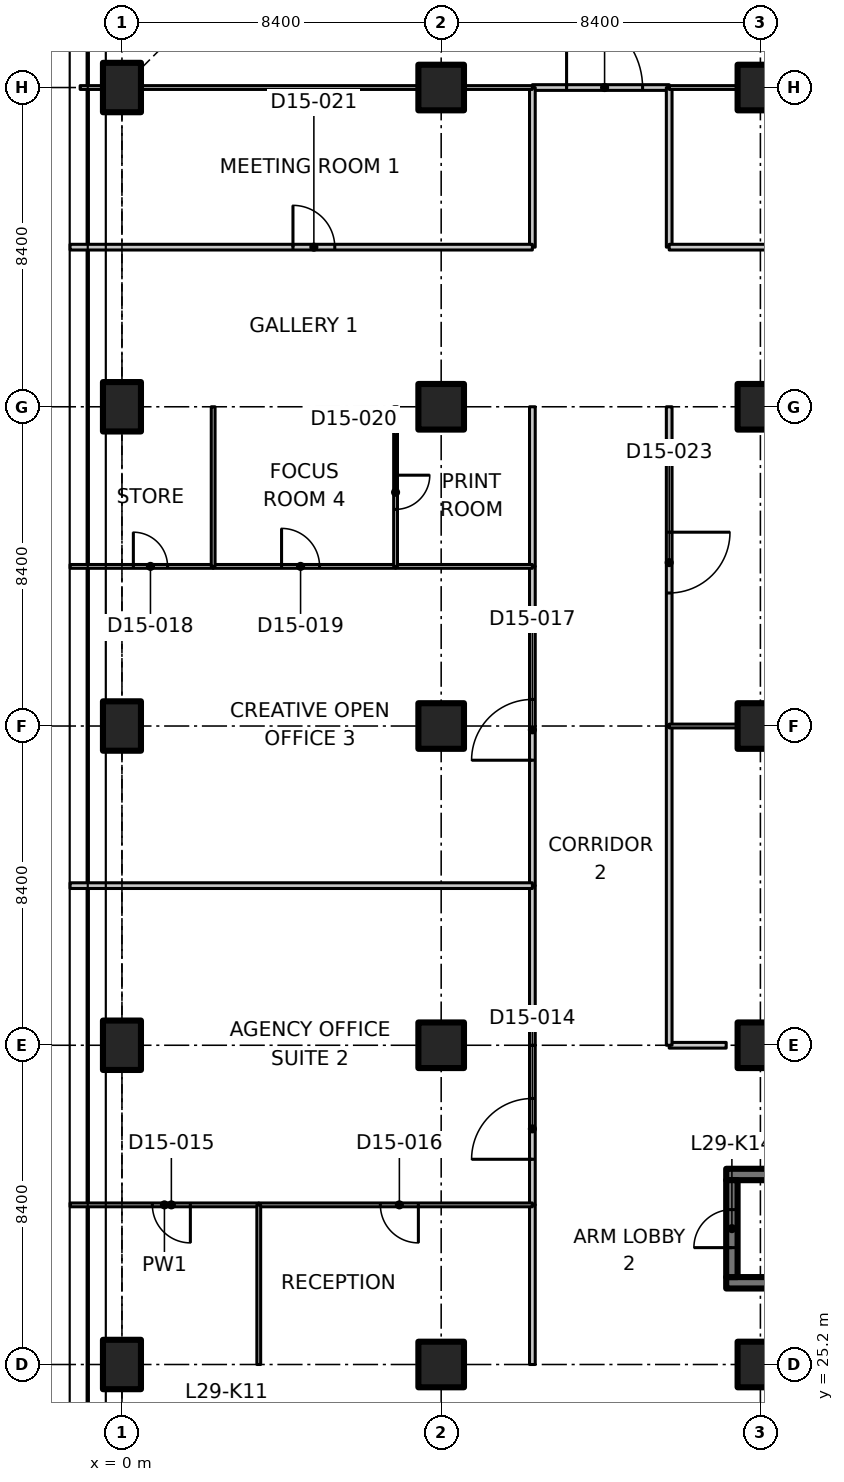
"""IFC4 building model, lengths in metres.
Left out: names, types, materials, properties, quantities, classifications, styles, units other than length and angle.
Written with IfcOpenShell. Run it as: python <this file> out.ifc"""

import sys

from ifc_helpers import new_model, si_unit, direction, frame, frame_2d, origin, origin_2d, place, context, subcontext, project, spatial, polyline, rectangle, outline, extrude, element, fill, save


model = new_model("IFC4")
c1 = context("Model", 3, precision=1e-05, world=origin(), true_north=direction((0.0, 1.0)))
c2 = subcontext(c1, "Body", "Model", "MODEL_VIEW")
j1 = project(units=[si_unit("LENGTHUNIT", "METRE"), si_unit("PLANEANGLEUNIT", "RADIAN")], contexts=[c1])
p1 = place(None, origin())
s1 = spatial("IfcSite", under=j1, at=p1, CompositionType="ELEMENT")
p2 = place(p1, origin())
s2 = spatial("IfcBuilding", under=s1, at=p2, CompositionType="ELEMENT")
p3 = place(p2, frame((0.0, 0.0, 120.5)))
s3 = spatial("IfcBuildingStorey", under=s2, at=p3, CompositionType="ELEMENT", Elevation=120.5)
for number, where, z_axis, x_axis in (
    (1, (0.0, 25.2, 0.0), (0.0, 0.0, 1.0), (1.0, 0.0, 0.0)),
    (2, (0.0, 33.6, 0.0), (0.0, 0.0, 1.0), (1.0, 0.0, 0.0)),
    (3, (0.0, 42.0, 0.0), (0.0, 0.0, 1.0), (1.0, 0.0, 0.0)),
    (4, (0.0, 50.4, 0.0), (0.0, 0.0, 1.0), (1.0, 0.0, 0.0)),
    (5, (0.0, 58.8, 0.0), (0.0, 0.0, 1.0), (1.0, 0.0, 0.0)),
):
    element("IfcColumn", number, at=place(p3, frame(where, z_axis=z_axis, x_axis=x_axis)), inside=s3, PredefinedType="COLUMN", context=c2, shape_type="SweptSolid", body=[
        extrude(rectangle(XDim=1.0, YDim=1.3, at=origin_2d()), origin(), (0.0, 0.0, 1.0), 3.35),
    ])
for number, where, z_axis, x_axis in (
    (6, (8.4, 25.2, 0.0), (0.0, 0.0, 1.0), (1.0, 0.0, 0.0)),
    (7, (8.4, 33.6, 0.0), (0.0, 0.0, 1.0), (1.0, 0.0, 0.0)),
    (8, (8.4, 42.0, 0.0), (0.0, 0.0, 1.0), (1.0, 0.0, 0.0)),
    (9, (8.4, 50.4, 0.0), (0.0, 0.0, 1.0), (1.0, 0.0, 0.0)),
    (10, (8.4, 58.8, 0.0), (0.0, 0.0, 1.0), (1.0, 0.0, 0.0)),
    (11, (16.8, 25.2, 0.0), (0.0, 0.0, 1.0), (1.0, 0.0, 0.0)),
    (12, (16.8, 33.6, 0.0), (0.0, 0.0, 1.0), (1.0, 0.0, 0.0)),
    (13, (16.8, 42.0, 0.0), (0.0, 0.0, 1.0), (1.0, 0.0, 0.0)),
    (14, (16.8, 50.4, 0.0), (0.0, 0.0, 1.0), (1.0, 0.0, 0.0)),
    (15, (16.8, 58.8, 0.0), (0.0, 0.0, 1.0), (1.0, 0.0, 0.0)),
):
    element("IfcColumn", number, at=place(p3, frame(where, z_axis=z_axis, x_axis=x_axis)), inside=s3, PredefinedType="COLUMN", context=c2, shape_type="SweptSolid", body=[
        extrude(rectangle(XDim=1.2, YDim=1.2, at=origin_2d()), origin(), (0.0, 0.0, 1.0), 3.35),
    ])
for number, where, z_axis, x_axis in (
    (16, (15.9, 27.35, 0.0), (0.0, 0.0, 1.0), (1.0, 0.0, 0.0)),
    (17, (15.9, 30.2, 0.0), (0.0, 0.0, 1.0), (1.0, 0.0, 0.0)),
):
    element("IfcWall", number, at=place(p3, frame(where, z_axis=z_axis, x_axis=x_axis)), inside=s3, PredefinedType="SHEAR", context=c2, shape_type="SweptSolid", body=[
        extrude(rectangle(XDim=8.2, YDim=0.3, at=frame_2d((4.1, 0.0))), origin(), (0.0, 0.0, 1.0), 3.35),
    ])
p4 = place(p3, frame((16.05, 27.5, 0.0), z_axis=(0.0, 0.0, 1.0), x_axis=(0.0, 1.0, 0.0)))
e18 = element("IfcWall", 18, at=p4, inside=s3, PredefinedType="SHEAR", context=c2, shape_type="SweptSolid", body=[
    extrude(rectangle(XDim=2.55, YDim=0.3, at=frame_2d((1.275, 0.0))), origin(), (0.0, 0.0, 1.0), 3.35),
])
p5 = place(p4, frame((0.775, 0.0, 0.0)))
e19 = element("IfcOpeningElement", 19, at=p5, cuts=e18, PredefinedType="OPENING", context=c2, shape_type="SweptSolid", body=[
    extrude(rectangle(XDim=1.0, YDim=2.1, at=frame_2d((0.5, 1.05))), frame((0.0, 0.16, 0.0), z_axis=(0.0, -1.0, 0.0), x_axis=(1.0, 0.0, 0.0)), (0.0, 0.0, 1.0), 0.32),
])
p6 = place(p3, frame((10.8, 29.4, 0.0), z_axis=(0.0, 0.0, 1.0), x_axis=(0.0, 1.0, 0.0)))
e20 = element("IfcWall", 20, at=p6, inside=s3, PredefinedType="PARTITIONING", context=c2, shape_type="SweptSolid", body=[
    extrude(rectangle(XDim=4.2, YDim=0.15, at=frame_2d((2.1, 0.0))), origin(), (0.0, 0.0, 1.0), 3.33),
])
p7 = place(p6, frame((1.2, 0.0, 0.0)))
e21 = element("IfcOpeningElement", 21, at=p7, cuts=e20, PredefinedType="OPENING", context=c2, shape_type="SweptSolid", body=[
    extrude(rectangle(XDim=1.6, YDim=2.1, at=frame_2d((0.8, 1.05))), frame((0.0, 0.085, 0.0), z_axis=(0.0, -1.0, 0.0), x_axis=(1.0, 0.0, 0.0)), (0.0, 0.0, 1.0), 0.17),
])
p8 = place(p3, frame((10.8, 25.2, 0.0), z_axis=(0.0, 0.0, 1.0), x_axis=(0.0, 1.0, 0.0)))
e22 = element("IfcWall", 22, at=p8, inside=s3, PredefinedType="PARTITIONING", context=c2, shape_type="SweptSolid", body=[
    extrude(rectangle(XDim=4.2, YDim=0.15, at=frame_2d((2.1, 0.0))), origin(), (0.0, 0.0, 1.0), 3.33),
])
p9 = place(p3, frame((14.4, 33.6, 0.0), z_axis=(0.0, 0.0, 1.0), x_axis=(1.0, 0.0, 0.0)))
e23 = element("IfcWall", 23, at=p9, inside=s3, PredefinedType="PARTITIONING", context=c2, shape_type="SweptSolid", body=[
    extrude(rectangle(XDim=1.5, YDim=0.15, at=frame_2d((0.75, 0.0))), origin(), (0.0, 0.0, 1.0), 3.33),
])
p10 = place(p3, frame((10.8, 58.8, 0.0), z_axis=(0.0, 0.0, 1.0), x_axis=(1.0, 0.0, 0.0)))
e24 = element("IfcWall", 24, at=p10, inside=s3, PredefinedType="PARTITIONING", context=c2, shape_type="SweptSolid", body=[
    extrude(rectangle(XDim=3.6, YDim=0.15, at=frame_2d((1.8, 0.0))), origin(), (0.0, 0.0, 1.0), 3.33),
])
p11 = place(p10, frame((0.9, 0.0, 0.0)))
e25 = element("IfcOpeningElement", 25, at=p11, cuts=e24, PredefinedType="OPENING", context=c2, shape_type="SweptSolid", body=[
    extrude(rectangle(XDim=2.0, YDim=2.4, at=frame_2d((1.0, 1.2))), frame((0.0, 0.085, 0.0), z_axis=(0.0, -1.0, 0.0), x_axis=(1.0, 0.0, 0.0)), (0.0, 0.0, 1.0), 0.17),
])
p12 = place(p3, frame((10.8, 33.6, 0.0), z_axis=(0.0, 0.0, 1.0), x_axis=(0.0, 1.0, 0.0)))
e26 = element("IfcWall", 26, at=p12, inside=s3, PredefinedType="PARTITIONING", context=c2, shape_type="SweptSolid", body=[
    extrude(rectangle(XDim=4.2, YDim=0.15, at=frame_2d((2.1, 0.0))), origin(), (0.0, 0.0, 1.0), 3.33),
])
p13 = place(p3, frame((10.8, 37.8, 0.0), z_axis=(0.0, 0.0, 1.0), x_axis=(0.0, 1.0, 0.0)))
e27 = element("IfcWall", 27, at=p13, inside=s3, PredefinedType="PARTITIONING", context=c2, shape_type="SweptSolid", body=[
    extrude(rectangle(XDim=8.4, YDim=0.15, at=frame_2d((4.2, 0.0))), origin(), (0.0, 0.0, 1.0), 3.33),
])
p14 = place(p13, frame((3.3, 0.0, 0.0)))
e28 = element("IfcOpeningElement", 28, at=p14, cuts=e27, PredefinedType="OPENING", context=c2, shape_type="SweptSolid", body=[
    extrude(rectangle(XDim=1.6, YDim=2.1, at=frame_2d((0.8, 1.05))), frame((0.0, 0.085, 0.0), z_axis=(0.0, -1.0, 0.0), x_axis=(1.0, 0.0, 0.0)), (0.0, 0.0, 1.0), 0.17),
])
for number, where, z_axis, x_axis in (
    (29, (10.8, 46.2, 0.0), (0.0, 0.0, 1.0), (0.0, 1.0, 0.0)),
    (30, (10.8, 54.6, 0.0), (0.0, 0.0, 1.0), (0.0, 1.0, 0.0)),
):
    element("IfcWall", number, at=place(p3, frame(where, z_axis=z_axis, x_axis=x_axis)), inside=s3, PredefinedType="PARTITIONING", context=c2, shape_type="SweptSolid", body=[
        extrude(rectangle(XDim=4.2, YDim=0.15, at=frame_2d((2.1, 0.0))), origin(), (0.0, 0.0, 1.0), 3.33),
    ])
p15 = place(p3, frame((14.4, 42.0, 0.0), z_axis=(0.0, 0.0, 1.0), x_axis=(0.0, -1.0, 0.0)))
e31 = element("IfcWall", 31, at=p15, inside=s3, PredefinedType="PARTITIONING", context=c2, shape_type="SweptSolid", body=[
    extrude(rectangle(XDim=8.4, YDim=0.15, at=frame_2d((4.2, 0.0))), origin(), (0.0, 0.0, 1.0), 3.33),
])
p16 = place(p3, frame((14.4, 50.4, 0.0), z_axis=(0.0, 0.0, 1.0), x_axis=(0.0, -1.0, 0.0)))
e32 = element("IfcWall", 32, at=p16, inside=s3, PredefinedType="PARTITIONING", context=c2, shape_type="SweptSolid", body=[
    extrude(rectangle(XDim=8.4, YDim=0.15, at=frame_2d((4.2, 0.0))), origin(), (0.0, 0.0, 1.0), 3.33),
])
p17 = place(p16, frame((3.3, 0.0, 0.0)))
e33 = element("IfcOpeningElement", 33, at=p17, cuts=e32, PredefinedType="OPENING", context=c2, shape_type="SweptSolid", body=[
    extrude(rectangle(XDim=1.6, YDim=2.1, at=frame_2d((0.8, 1.05))), frame((0.0, 0.085, 0.0), z_axis=(0.0, -1.0, 0.0), x_axis=(1.0, 0.0, 0.0)), (0.0, 0.0, 1.0), 0.17),
])
p18 = place(p3, frame((14.4, 58.8, 0.0), z_axis=(0.0, 0.0, 1.0), x_axis=(0.0, -1.0, 0.0)))
e34 = element("IfcWall", 34, at=p18, inside=s3, PredefinedType="PARTITIONING", context=c2, shape_type="SweptSolid", body=[
    extrude(rectangle(XDim=4.2, YDim=0.15, at=frame_2d((2.1, 0.0))), origin(), (0.0, 0.0, 1.0), 3.33),
])
p19 = place(p3, frame((10.8, 58.8, 0.0), z_axis=(0.0, 0.0, 1.0), x_axis=(-1.0, 0.0, 0.0)))
e35 = element("IfcWall", 35, at=p19, inside=s3, PredefinedType="PARTITIONING", context=c2, shape_type="SweptSolid", body=[
    extrude(rectangle(XDim=1.78, YDim=0.1, at=frame_2d((0.89, 0.0))), origin(), (0.0, 0.0, 1.0), 3.33),
])
p20 = place(p3, frame((7.78, 58.8, 0.0), z_axis=(0.0, 0.0, 1.0), x_axis=(-1.0, 0.0, 0.0)))
e36 = element("IfcWall", 36, at=p20, inside=s3, PredefinedType="PARTITIONING", context=c2, shape_type="SweptSolid", body=[
    extrude(outline(polyline([(0.0, 0.0), (7.26, 0.0), (7.26, 2.98), (7.116, 2.98), (7.114, 3.33), (0.0, 3.33), (0.0, 0.0)])), frame((0.0, 0.05, 0.0), z_axis=(0.0, -1.0, 0.0), x_axis=(1.0, 0.0, 0.0)), (0.0, 0.0, 1.0), 0.1),
])
p21 = place(p3, frame((-0.52, 58.8, 0.0), z_axis=(0.0, 0.0, 1.0), x_axis=(-1.0, 0.0, 0.0)))
e37 = element("IfcWall", 37, at=p21, inside=s3, PredefinedType="PARTITIONING", context=c2, shape_type="SweptSolid", body=[
    extrude(rectangle(XDim=0.58, YDim=0.1, at=frame_2d((0.29, 0.0))), origin(), (0.0, 0.0, 1.0), 3.33),
])
p22 = place(p3, frame((16.18, 58.8, 0.0), z_axis=(0.0, 0.0, 1.0), x_axis=(-1.0, 0.0, 0.0)))
e38 = element("IfcWall", 38, at=p22, inside=s3, PredefinedType="PARTITIONING", context=c2, shape_type="SweptSolid", body=[
    extrude(rectangle(XDim=1.78, YDim=0.1, at=frame_2d((0.89, 0.0))), origin(), (0.0, 0.0, 1.0), 3.33),
])
p23 = place(p3, frame((-1.365, 54.6, 0.0), z_axis=(0.0, 0.0, 1.0), x_axis=(1.0, 0.0, 0.0)))
e39 = element("IfcWall", 39, at=p23, inside=s3, PredefinedType="PARTITIONING", context=c2, shape_type="SweptSolid", body=[
    extrude(outline(polyline([(0.0, 0.0), (12.165, 0.0), (12.165, 3.33), (1.815, 3.33), (1.813, 2.98), (0.917, 2.98), (0.915, 3.33), (0.265, 3.33), (0.0, 3.33), (0.0, 0.0)])), frame((0.0, 0.075, 0.0), z_axis=(0.0, -1.0, 0.0), x_axis=(1.0, 0.0, 0.0)), (0.0, 0.0, 1.0), 0.15),
])
p24 = place(p23, frame((5.865, 0.0, 0.0)))
e40 = element("IfcOpeningElement", 40, at=p24, cuts=e39, PredefinedType="OPENING", context=c2, shape_type="SweptSolid", body=[
    extrude(rectangle(XDim=1.1, YDim=2.1, at=frame_2d((0.55, 1.05))), frame((0.0, 0.085, 0.0), z_axis=(0.0, -1.0, 0.0), x_axis=(1.0, 0.0, 0.0)), (0.0, 0.0, 1.0), 0.17),
])
p25 = place(p3, frame((3.6, 29.4, 0.0), z_axis=(0.0, 0.0, 1.0), x_axis=(-1.0, 0.0, 0.0)))
e41 = element("IfcWall", 41, at=p25, inside=s3, PredefinedType="PARTITIONING", context=c2, shape_type="SweptSolid", body=[
    extrude(outline(polyline([(0.0, 0.0), (4.965, 0.0), (4.965, 3.33), (4.7, 3.33), (4.05, 3.33), (4.048, 2.98), (3.152, 2.98), (3.15, 3.33), (0.0, 3.33), (0.0, 0.0)])), frame((0.0, 0.05, 0.0), z_axis=(0.0, -1.0, 0.0), x_axis=(1.0, 0.0, 0.0)), (0.0, 0.0, 1.0), 0.1),
])
p26 = place(p25, frame((1.8, 0.0, 0.0)))
e42 = element("IfcOpeningElement", 42, at=p26, cuts=e41, PredefinedType="OPENING", context=c2, shape_type="SweptSolid", body=[
    extrude(rectangle(XDim=1.0, YDim=2.1, at=frame_2d((0.5, 1.05))), frame((0.0, 0.06, 0.0), z_axis=(0.0, -1.0, 0.0), x_axis=(1.0, 0.0, 0.0)), (0.0, 0.0, 1.0), 0.12),
])
p27 = place(p3, frame((10.8, 29.4, 0.0), z_axis=(0.0, 0.0, 1.0), x_axis=(-1.0, 0.0, 0.0)))
e43 = element("IfcWall", 43, at=p27, inside=s3, PredefinedType="PARTITIONING", context=c2, shape_type="SweptSolid", body=[
    extrude(rectangle(XDim=7.2, YDim=0.1, at=frame_2d((3.6, 0.0))), origin(), (0.0, 0.0, 1.0), 3.33),
])
p28 = place(p27, frame((3.0, 0.0, 0.0)))
e44 = element("IfcOpeningElement", 44, at=p28, cuts=e43, PredefinedType="OPENING", context=c2, shape_type="SweptSolid", body=[
    extrude(rectangle(XDim=1.0, YDim=2.1, at=frame_2d((0.5, 1.05))), frame((0.0, 0.06, 0.0), z_axis=(0.0, -1.0, 0.0), x_axis=(1.0, 0.0, 0.0)), (0.0, 0.0, 1.0), 0.12),
])
p29 = place(p3, frame((-1.365, 37.8, 0.0), z_axis=(0.0, 0.0, 1.0), x_axis=(1.0, 0.0, 0.0)))
e45 = element("IfcWall", 45, at=p29, inside=s3, PredefinedType="PARTITIONING", context=c2, shape_type="SweptSolid", body=[
    extrude(outline(polyline([(0.0, 0.0), (12.165, 0.0), (12.165, 3.33), (1.815, 3.33), (1.813, 2.98), (0.917, 2.98), (0.915, 3.33), (0.265, 3.33), (0.0, 3.33), (0.0, 0.0)])), frame((0.0, 0.075, 0.0), z_axis=(0.0, -1.0, 0.0), x_axis=(1.0, 0.0, 0.0)), (0.0, 0.0, 1.0), 0.15),
])
p30 = place(p3, frame((3.6, 29.4, 0.0), z_axis=(0.0, 0.0, 1.0), x_axis=(0.0, -1.0, 0.0)))
e46 = element("IfcWall", 46, at=p30, inside=s3, PredefinedType="PARTITIONING", context=c2, shape_type="SweptSolid", body=[
    extrude(rectangle(XDim=4.2, YDim=0.1, at=frame_2d((2.1, 0.0))), origin(), (0.0, 0.0, 1.0), 3.33),
])
p31 = place(p3, frame((-1.365, 46.2, 0.0), z_axis=(0.0, 0.0, 1.0), x_axis=(1.0, 0.0, 0.0)))
e47 = element("IfcWall", 47, at=p31, inside=s3, PredefinedType="PARTITIONING", context=c2, shape_type="SweptSolid", body=[
    extrude(rectangle(XDim=3.765, YDim=0.1, at=frame_2d((1.882, 0.0))), origin(), (0.0, 0.0, 1.0), 2.98),
])
p32 = place(p31, frame((1.665, 0.0, 0.0)))
e48 = element("IfcOpeningElement", 48, at=p32, cuts=e47, PredefinedType="OPENING", context=c2, shape_type="SweptSolid", body=[
    extrude(rectangle(XDim=0.9, YDim=2.1, at=frame_2d((0.45, 1.05))), frame((0.0, 0.06, 0.0), z_axis=(0.0, -1.0, 0.0), x_axis=(1.0, 0.0, 0.0)), (0.0, 0.0, 1.0), 0.12),
])
p33 = place(p3, frame((2.4, 46.2, 0.0), z_axis=(0.0, 0.0, 1.0), x_axis=(1.0, 0.0, 0.0)))
e49 = element("IfcWall", 49, at=p33, inside=s3, PredefinedType="PARTITIONING", context=c2, shape_type="SweptSolid", body=[
    extrude(rectangle(XDim=4.8, YDim=0.1, at=frame_2d((2.4, 0.0))), origin(), (0.0, 0.0, 1.0), 3.33),
])
p34 = place(p33, frame((1.8, 0.0, 0.0)))
e50 = element("IfcOpeningElement", 50, at=p34, cuts=e49, PredefinedType="OPENING", context=c2, shape_type="SweptSolid", body=[
    extrude(rectangle(XDim=1.0, YDim=2.1, at=frame_2d((0.5, 1.05))), frame((0.0, 0.06, 0.0), z_axis=(0.0, -1.0, 0.0), x_axis=(1.0, 0.0, 0.0)), (0.0, 0.0, 1.0), 0.12),
])
p35 = place(p3, frame((7.2, 46.2, 0.0), z_axis=(0.0, 0.0, 1.0), x_axis=(1.0, 0.0, 0.0)))
e51 = element("IfcWall", 51, at=p35, inside=s3, PredefinedType="PARTITIONING", context=c2, shape_type="SweptSolid", body=[
    extrude(rectangle(XDim=3.6, YDim=0.1, at=frame_2d((1.8, 0.0))), origin(), (0.0, 0.0, 1.0), 3.33),
])
p36 = place(p3, frame((2.4, 50.4, 0.0), z_axis=(0.0, 0.0, 1.0), x_axis=(0.0, -1.0, 0.0)))
e52 = element("IfcWall", 52, at=p36, inside=s3, PredefinedType="PARTITIONING", context=c2, shape_type="SweptSolid", body=[
    extrude(rectangle(XDim=4.2, YDim=0.1, at=frame_2d((2.1, 0.0))), origin(), (0.0, 0.0, 1.0), 3.33),
])
p37 = place(p3, frame((7.2, 50.4, 0.0), z_axis=(0.0, 0.0, 1.0), x_axis=(0.0, -1.0, 0.0)))
e53 = element("IfcWall", 53, at=p37, inside=s3, PredefinedType="PARTITIONING", context=c2, shape_type="SweptSolid", body=[
    extrude(rectangle(XDim=4.2, YDim=0.1, at=frame_2d((2.1, 0.0))), origin(), (0.0, 0.0, 1.0), 3.33),
])
p38 = place(p37, frame((1.8, 0.0, 0.0)))
e54 = element("IfcOpeningElement", 54, at=p38, cuts=e53, PredefinedType="OPENING", context=c2, shape_type="SweptSolid", body=[
    extrude(rectangle(XDim=0.9, YDim=2.1, at=frame_2d((0.45, 1.05))), frame((0.0, 0.06, 0.0), z_axis=(0.0, -1.0, 0.0), x_axis=(1.0, 0.0, 0.0)), (0.0, 0.0, 1.0), 0.12),
])
p39 = place(p3, frame((14.4, 54.6, 0.0), z_axis=(0.0, 0.0, 1.0), x_axis=(1.0, 0.0, 0.0)))
e55 = element("IfcWall", 55, at=p39, inside=s3, PredefinedType="PARTITIONING", context=c2, shape_type="SweptSolid", body=[
    extrude(outline(polyline([(0.0, 0.0), (12.165, 0.0), (12.165, 3.33), (11.9, 3.33), (11.25, 3.33), (11.248, 2.98), (10.352, 2.98), (10.35, 3.33), (0.0, 3.33), (0.0, 0.0)])), frame((0.0, 0.075, 0.0), z_axis=(0.0, -1.0, 0.0), x_axis=(1.0, 0.0, 0.0)), (0.0, 0.0, 1.0), 0.15),
])
p40 = place(p39, frame((5.4, 0.0, 0.0)))
e56 = element("IfcOpeningElement", 56, at=p40, cuts=e55, PredefinedType="OPENING", context=c2, shape_type="SweptSolid", body=[
    extrude(rectangle(XDim=1.1, YDim=2.1, at=frame_2d((0.55, 1.05))), frame((0.0, 0.085, 0.0), z_axis=(0.0, -1.0, 0.0), x_axis=(1.0, 0.0, 0.0)), (0.0, 0.0, 1.0), 0.17),
])
p41 = place(p3, frame((14.4, 42.0, 0.0), z_axis=(0.0, 0.0, 1.0), x_axis=(1.0, 0.0, 0.0)))
e57 = element("IfcWall", 57, at=p41, inside=s3, PredefinedType="PARTITIONING", context=c2, shape_type="SweptSolid", body=[
    extrude(rectangle(XDim=1.78, YDim=0.1, at=frame_2d((0.89, 0.0))), origin(), (0.0, 0.0, 1.0), 3.33),
])
p42 = place(p5, origin())
e58 = element("IfcDoor", 58, at=p42, inside=s3, OperationType="SINGLE_SWING_LEFT", PredefinedType="DOOR", context=c2, shape_type="SweptSolid", body=[
    extrude(rectangle(XDim=1.0, YDim=2.1, at=frame_2d((0.5, 1.05))), frame((0.0, 0.025, 0.0), z_axis=(0.0, -1.0, 0.0), x_axis=(1.0, 0.0, 0.0)), (0.0, 0.0, 1.0), 0.05),
])
fill(e19, e58)
p43 = place(p11, origin())
e59 = element("IfcDoor", 59, at=p43, inside=s3, OperationType="DOUBLE_DOOR_SINGLE_SWING", PredefinedType="DOOR", context=c2, shape_type="SweptSolid", body=[
    extrude(rectangle(XDim=2.0, YDim=2.4, at=frame_2d((1.0, 1.2))), frame((0.0, 0.025, 0.0), z_axis=(0.0, -1.0, 0.0), x_axis=(1.0, 0.0, 0.0)), (0.0, 0.0, 1.0), 0.05),
])
fill(e25, e59)
p44 = place(p7, origin())
e60 = element("IfcDoor", 60, at=p44, inside=s3, OperationType="DOUBLE_DOOR_SINGLE_SWING", PredefinedType="DOOR", context=c2, shape_type="SweptSolid", body=[
    extrude(rectangle(XDim=1.6, YDim=2.1, at=frame_2d((0.8, 1.05))), frame((0.0, 0.025, 0.0), z_axis=(0.0, -1.0, 0.0), x_axis=(1.0, 0.0, 0.0)), (0.0, 0.0, 1.0), 0.05),
])
fill(e21, e60)
p45 = place(p26, origin())
e61 = element("IfcDoor", 61, at=p45, inside=s3, OperationType="SINGLE_SWING_LEFT", PredefinedType="DOOR", context=c2, shape_type="SweptSolid", body=[
    extrude(rectangle(XDim=1.0, YDim=2.1, at=frame_2d((0.5, 1.05))), frame((0.0, 0.025, 0.0), z_axis=(0.0, -1.0, 0.0), x_axis=(1.0, 0.0, 0.0)), (0.0, 0.0, 1.0), 0.05),
])
fill(e42, e61)
p46 = place(p28, origin())
e62 = element("IfcDoor", 62, at=p46, inside=s3, OperationType="SINGLE_SWING_LEFT", PredefinedType="DOOR", context=c2, shape_type="SweptSolid", body=[
    extrude(rectangle(XDim=1.0, YDim=2.1, at=frame_2d((0.5, 1.05))), frame((0.0, 0.025, 0.0), z_axis=(0.0, -1.0, 0.0), x_axis=(1.0, 0.0, 0.0)), (0.0, 0.0, 1.0), 0.05),
])
fill(e44, e62)
p47 = place(p14, origin())
e63 = element("IfcDoor", 63, at=p47, inside=s3, OperationType="DOUBLE_DOOR_SINGLE_SWING", PredefinedType="DOOR", context=c2, shape_type="SweptSolid", body=[
    extrude(rectangle(XDim=1.6, YDim=2.1, at=frame_2d((0.8, 1.05))), frame((0.0, 0.025, 0.0), z_axis=(0.0, -1.0, 0.0), x_axis=(1.0, 0.0, 0.0)), (0.0, 0.0, 1.0), 0.05),
])
fill(e28, e63)
p48 = place(p32, origin())
e64 = element("IfcDoor", 64, at=p48, inside=s3, OperationType="SINGLE_SWING_LEFT", PredefinedType="DOOR", context=c2, shape_type="SweptSolid", body=[
    extrude(rectangle(XDim=0.9, YDim=2.1, at=frame_2d((0.45, 1.05))), frame((0.0, 0.025, 0.0), z_axis=(0.0, -1.0, 0.0), x_axis=(1.0, 0.0, 0.0)), (0.0, 0.0, 1.0), 0.05),
])
fill(e48, e64)
p49 = place(p34, origin())
e65 = element("IfcDoor", 65, at=p49, inside=s3, OperationType="SINGLE_SWING_LEFT", PredefinedType="DOOR", context=c2, shape_type="SweptSolid", body=[
    extrude(rectangle(XDim=1.0, YDim=2.1, at=frame_2d((0.5, 1.05))), frame((0.0, 0.025, 0.0), z_axis=(0.0, -1.0, 0.0), x_axis=(1.0, 0.0, 0.0)), (0.0, 0.0, 1.0), 0.05),
])
fill(e50, e65)
p50 = place(p38, origin())
e66 = element("IfcDoor", 66, at=p50, inside=s3, OperationType="SINGLE_SWING_LEFT", PredefinedType="DOOR", context=c2, shape_type="SweptSolid", body=[
    extrude(rectangle(XDim=0.9, YDim=2.1, at=frame_2d((0.45, 1.05))), frame((0.0, 0.025, 0.0), z_axis=(0.0, -1.0, 0.0), x_axis=(1.0, 0.0, 0.0)), (0.0, 0.0, 1.0), 0.05),
])
fill(e54, e66)
p51 = place(p24, origin())
e67 = element("IfcDoor", 67, at=p51, inside=s3, OperationType="SINGLE_SWING_LEFT", PredefinedType="DOOR", context=c2, shape_type="SweptSolid", body=[
    extrude(rectangle(XDim=1.1, YDim=2.1, at=frame_2d((0.55, 1.05))), frame((0.0, 0.025, 0.0), z_axis=(0.0, -1.0, 0.0), x_axis=(1.0, 0.0, 0.0)), (0.0, 0.0, 1.0), 0.05),
])
fill(e40, e67)
p52 = place(p17, origin())
e68 = element("IfcDoor", 68, at=p52, inside=s3, OperationType="DOUBLE_DOOR_SINGLE_SWING", PredefinedType="DOOR", context=c2, shape_type="SweptSolid", body=[
    extrude(rectangle(XDim=1.6, YDim=2.1, at=frame_2d((0.8, 1.05))), frame((0.0, 0.025, 0.0), z_axis=(0.0, -1.0, 0.0), x_axis=(1.0, 0.0, 0.0)), (0.0, 0.0, 1.0), 0.05),
])
fill(e33, e68)
save(model, sys.argv[1])
